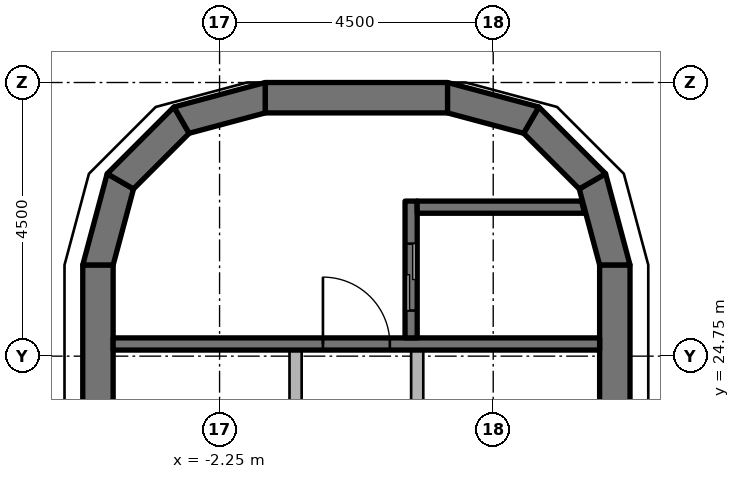
"""IFC4 building model, lengths in metres.
Left out: names, types, materials, properties, quantities, classifications, styles, units other than length and angle.
Written with IfcOpenShell. Run it as: python <this file> out.ifc"""

import sys

from ifc_helpers import new_model, si_unit, direction, frame, frame_2d, origin, place, context, subcontext, project, spatial, polyline, rectangle, outline, extrude, element, fill, save


model = new_model("IFC4")
c1 = context("Model", 3, precision=1e-05, world=origin(), true_north=direction((0.0, 1.0)))
c2 = subcontext(c1, "Body", "Model", "MODEL_VIEW")
j1 = project(units=[si_unit("LENGTHUNIT", "METRE"), si_unit("PLANEANGLEUNIT", "RADIAN")], contexts=[c1])
p1 = place(None, origin())
s1 = spatial("IfcSite", under=j1, at=p1, CompositionType="ELEMENT")
p2 = place(p1, origin())
s2 = spatial("IfcBuilding", under=s1, at=p2, CompositionType="ELEMENT")
p3 = place(p2, frame((0.0, 0.0, 313.2)))
s3 = spatial("IfcBuildingStorey", under=s2, at=p3, CompositionType="ELEMENT", Elevation=313.2)
for number, where, z_axis, x_axis in (
    (1, (-4.25, 11.25, 0.0), (0.0, 0.0, 1.0), (0.0, 1.0, 0.0)),
    (2, (4.25, 11.25, 0.0), (0.0, 0.0, 1.0), (0.0, 1.0, 0.0)),
):
    element("IfcWall", number, at=place(p3, frame(where, z_axis=z_axis, x_axis=x_axis)), inside=s3, PredefinedType="SHEAR", context=c2, shape_type="SweptSolid", body=[
        extrude(rectangle(XDim=15.0, YDim=0.5, at=frame_2d((7.5, 0.0))), origin(), (0.0, 0.0, 1.0), 3.6),
    ])
p4 = place(p3, frame((-1.5, 29.0, 0.0), z_axis=(0.0, 0.0, 1.0), x_axis=(1.0, 0.0, 0.0)))
e3 = element("IfcWall", 3, at=p4, inside=s3, PredefinedType="SHEAR", context=c2, shape_type="SweptSolid", body=[
    extrude(rectangle(XDim=3.0, YDim=0.5, at=frame_2d((1.5, 0.0))), origin(), (0.0, 0.0, 1.0), 3.6),
])
p5 = place(p3, origin())
e4 = element("IfcWall", 4, at=p5, inside=s3, PredefinedType="SHEAR", context=c2, shape_type="SweptSolid", body=[
    extrude(outline(polyline([(-4.5, 26.25), (-4.098, 27.75), (-3.665, 27.5), (-4.0, 26.25), (-4.5, 26.25)])), origin(), (0.0, 0.0, 1.0), 3.6),
])
p6 = place(p3, origin())
e5 = element("IfcWall", 5, at=p6, inside=s3, PredefinedType="SHEAR", context=c2, shape_type="SweptSolid", body=[
    extrude(outline(polyline([(-4.098, 27.75), (-3.0, 28.848), (-2.75, 28.415), (-3.665, 27.5), (-4.098, 27.75)])), origin(), (0.0, 0.0, 1.0), 3.6),
])
p7 = place(p3, origin())
e6 = element("IfcWall", 6, at=p7, inside=s3, PredefinedType="SHEAR", context=c2, shape_type="SweptSolid", body=[
    extrude(outline(polyline([(-3.0, 28.848), (-1.5, 29.25), (-1.5, 28.75), (-2.75, 28.415), (-3.0, 28.848)])), origin(), (0.0, 0.0, 1.0), 3.6),
])
p8 = place(p3, origin())
e7 = element("IfcWall", 7, at=p8, inside=s3, PredefinedType="SHEAR", context=c2, shape_type="SweptSolid", body=[
    extrude(outline(polyline([(4.5, 26.25), (4.098, 27.75), (3.665, 27.5), (4.0, 26.25), (4.5, 26.25)])), origin(), (0.0, 0.0, 1.0), 3.6),
])
p9 = place(p3, origin())
e8 = element("IfcWall", 8, at=p9, inside=s3, PredefinedType="SHEAR", context=c2, shape_type="SweptSolid", body=[
    extrude(outline(polyline([(4.098, 27.75), (3.0, 28.848), (2.75, 28.415), (3.665, 27.5), (4.098, 27.75)])), origin(), (0.0, 0.0, 1.0), 3.6),
])
p10 = place(p3, origin())
e9 = element("IfcWall", 9, at=p10, inside=s3, PredefinedType="SHEAR", context=c2, shape_type="SweptSolid", body=[
    extrude(outline(polyline([(3.0, 28.848), (1.5, 29.25), (1.5, 28.75), (2.75, 28.415), (3.0, 28.848)])), origin(), (0.0, 0.0, 1.0), 3.6),
])
p11 = place(p3, frame((-4.0, 24.95, 0.0), z_axis=(0.0, 0.0, 1.0), x_axis=(1.0, 0.0, 0.0)))
e10 = element("IfcWall", 10, at=p11, inside=s3, PredefinedType="SHEAR", context=c2, shape_type="SweptSolid", body=[
    extrude(rectangle(XDim=8.0, YDim=0.2, at=frame_2d((4.0, 0.0))), origin(), (0.0, 0.0, 1.0), 3.45),
])
p12 = place(p11, frame((3.45, 0.0, 0.0)))
e11 = element("IfcOpeningElement", 11, at=p12, cuts=e10, PredefinedType="OPENING", context=c2, shape_type="SweptSolid", body=[
    extrude(rectangle(XDim=1.1, YDim=2.1, at=frame_2d((0.55, 1.05))), frame((0.0, 0.11, 0.0), z_axis=(0.0, -1.0, 0.0), x_axis=(1.0, 0.0, 0.0)), (0.0, 0.0, 1.0), 0.22),
])
p13 = place(p3, frame((0.9, 27.3, 0.0), z_axis=(0.0, 0.0, 1.0), x_axis=(0.0, -1.0, 0.0)))
e12 = element("IfcWall", 12, at=p13, inside=s3, PredefinedType="SHEAR", context=c2, shape_type="SweptSolid", body=[
    extrude(rectangle(XDim=2.25, YDim=0.2, at=frame_2d((1.125, 0.0))), origin(), (0.0, 0.0, 1.0), 3.45),
])
p14 = place(p13, frame((0.7, 0.0, 0.0)))
e13 = element("IfcOpeningElement", 13, at=p14, cuts=e12, PredefinedType="OPENING", context=c2, shape_type="SweptSolid", body=[
    extrude(rectangle(XDim=1.1, YDim=2.3, at=frame_2d((0.55, 1.15))), frame((0.0, 0.11, 0.0), z_axis=(0.0, -1.0, 0.0), x_axis=(1.0, 0.0, 0.0)), (0.0, 0.0, 1.0), 0.22),
])
p15 = place(p3, origin())
e14 = element("IfcWall", 14, at=p15, inside=s3, PredefinedType="SHEAR", context=c2, shape_type="SweptSolid", body=[
    extrude(outline(polyline([(1.0, 27.1), (3.755, 27.1), (3.701, 27.3), (1.0, 27.3), (1.0, 27.1)])), origin(), (0.0, 0.0, 1.0), 3.45),
])
for number, where, z_axis, x_axis in (
    (15, (-1.0, 24.85, 0.0), (0.0, 0.0, 1.0), (0.0, -1.0, 0.0)),
    (16, (1.0, 24.85, 0.0), (0.0, 0.0, 1.0), (0.0, -1.0, 0.0)),
):
    element("IfcWall", number, at=place(p3, frame(where, z_axis=z_axis, x_axis=x_axis)), inside=s3, PredefinedType="PARTITIONING", context=c2, shape_type="SweptSolid", body=[
        extrude(rectangle(XDim=4.6, YDim=0.2, at=frame_2d((2.3, 0.0))), origin(), (0.0, 0.0, 1.0), 3.45),
    ])
p16 = place(p12, origin())
e17 = element("IfcDoor", 17, at=p16, inside=s3, OperationType="SINGLE_SWING_LEFT", PredefinedType="DOOR", context=c2, shape_type="SweptSolid", body=[
    extrude(rectangle(XDim=1.1, YDim=2.1, at=frame_2d((0.55, 1.05))), frame((0.0, 0.025, 0.0), z_axis=(0.0, -1.0, 0.0), x_axis=(1.0, 0.0, 0.0)), (0.0, 0.0, 1.0), 0.05),
])
fill(e11, e17)
p17 = place(p14, origin())
e18 = element("IfcDoor", 18, at=p17, inside=s3, OperationType="DOUBLE_DOOR_SLIDING", PredefinedType="DOOR", context=c2, shape_type="SweptSolid", body=[
    extrude(rectangle(XDim=1.1, YDim=2.3, at=frame_2d((0.55, 1.15))), frame((0.0, 0.025, 0.0), z_axis=(0.0, -1.0, 0.0), x_axis=(1.0, 0.0, 0.0)), (0.0, 0.0, 1.0), 0.05),
])
fill(e13, e18)
save(model, sys.argv[1])
